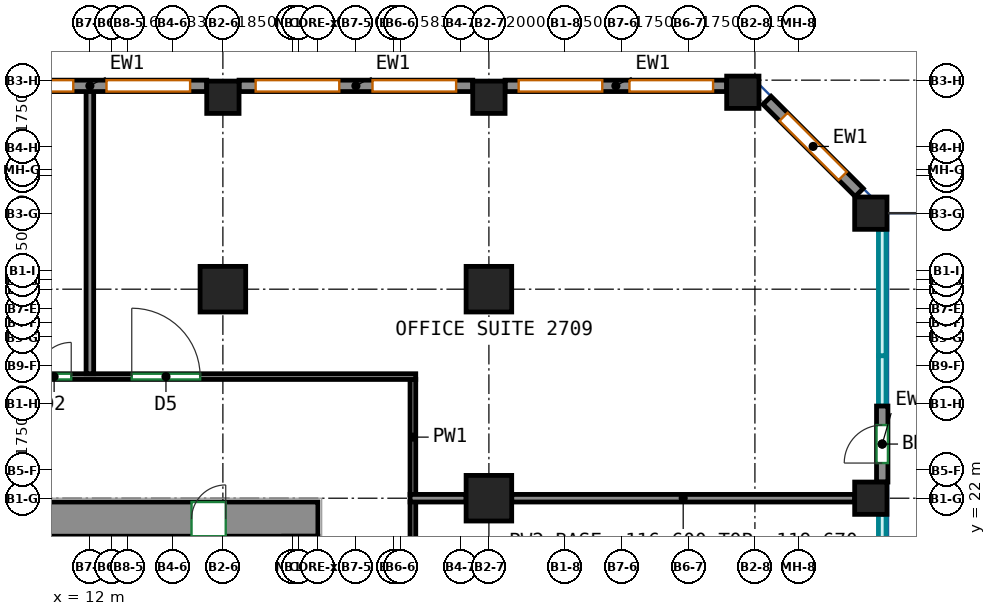
"""IFC4 building model, lengths in metres.
Left out: names, types, materials, properties, quantities, classifications, styles, units other than length and angle.
Written with IfcOpenShell. Run it as: python <this file> out.ifc"""

import sys

from ifc_helpers import new_model, si_unit, direction, frame, frame_2d, origin, origin_2d, place, context, subcontext, project, spatial, rectangle, extrude, source, transform, mapped, element, fill, save


model = new_model("IFC4")
c1 = context("Model", 3, precision=1e-05, world=origin(), true_north=direction((0.0, 1.0)))
c2 = subcontext(c1, "Body", "Model", "MODEL_VIEW")
j1 = project(units=[si_unit("LENGTHUNIT", "METRE"), si_unit("PLANEANGLEUNIT", "RADIAN")], contexts=[c1])
p1 = place(None, origin())
s1 = spatial("IfcSite", under=j1, at=p1, CompositionType="ELEMENT")
p2 = place(p1, origin())
s2 = spatial("IfcBuilding", under=s1, at=p2, CompositionType="ELEMENT")
p3 = place(p2, frame((0.0, 0.0, 116.6)))
s3 = spatial("IfcBuildingStorey", under=s2, at=p3, CompositionType="ELEMENT", Elevation=116.6)
m1 = source(origin(), c2, "Body", "SweptSolid", [
    extrude(rectangle(XDim=1.2, YDim=1.2, at=origin_2d()), origin(), (0.0, 0.0, 1.0), 3.72),
])
p4 = place(p3, frame((15.5, 27.5, 0.0), z_axis=(0.0, 0.0, 1.0), x_axis=(1.0, 0.0, 0.0)))
e1 = element("IfcColumn", 1, at=p4, inside=s3, PredefinedType="COLUMN", context=c2, shape_type="MappedRepresentation", body=[
    mapped(m1, transform((0.0, 0.0, 0.0))),
])
m2 = source(origin(), c2, "Body", "SweptSolid", [
    extrude(rectangle(XDim=0.85, YDim=0.85, at=origin_2d()), origin(), (0.0, 0.0, 1.0), 3.72),
])
p5 = place(p3, frame((15.5, 32.55, 0.0), z_axis=(0.0, 0.0, 1.0), x_axis=(1.0, 0.0, 0.0)))
e2 = element("IfcColumn", 2, at=p5, inside=s3, PredefinedType="COLUMN", context=c2, shape_type="MappedRepresentation", body=[
    mapped(m2, transform((0.0, 0.0, 0.0))),
])
for number, where, z_axis, x_axis in (
    (3, (22.5, 22.0, 0.0), (0.0, 0.0, 1.0), (1.0, 0.0, 0.0)),
    (4, (22.5, 27.5, 0.0), (0.0, 0.0, 1.0), (1.0, 0.0, 0.0)),
):
    element("IfcColumn", number, at=place(p3, frame(where, z_axis=z_axis, x_axis=x_axis)), inside=s3, PredefinedType="COLUMN", context=c2, shape_type="MappedRepresentation", body=[
        mapped(m1, transform((0.0, 0.0, 0.0))),
    ])
for number, where, z_axis, x_axis in (
    (5, (22.5, 32.55, 0.0), (0.0, 0.0, 1.0), (1.0, 0.0, 0.0)),
    (6, (29.182, 32.682, 0.0), (0.0, 0.0, 1.0), (1.0, 0.0, 0.0)),
    (7, (32.55, 22.0, 0.0), (0.0, 0.0, 1.0), (1.0, 0.0, 0.0)),
    (8, (32.55, 29.5, 0.0), (0.0, 0.0, 1.0), (1.0, 0.0, 0.0)),
):
    element("IfcColumn", number, at=place(p3, frame(where, z_axis=z_axis, x_axis=x_axis)), inside=s3, PredefinedType="COLUMN", context=c2, shape_type="MappedRepresentation", body=[
        mapped(m2, transform((0.0, 0.0, 0.0))),
    ])
m3 = source(origin(), c2, "Body", "SweptSolid", [
    extrude(rectangle(XDim=33.9, YDim=0.9, at=frame_2d((16.95, 0.0))), origin(), (0.0, 0.0, 1.0), 3.72),
])
p6 = place(p3, frame((-15.9, 21.45, 0.0), z_axis=(0.0, 0.0, 1.0), x_axis=(1.0, 0.0, 0.0)))
e9 = element("IfcWall", 9, at=p6, inside=s3, PredefinedType="SHEAR", context=c2, shape_type="MappedRepresentation", body=[
    mapped(m3, transform((0.0, 0.0, 0.0))),
])
p7 = place(p6, frame((7.12, 0.0, 0.0)))
e10 = element("IfcOpeningElement", 10, at=p7, cuts=e9, PredefinedType="OPENING", context=c2, shape_type="SweptSolid", body=[
    extrude(rectangle(XDim=0.9, YDim=2.1, at=frame_2d((0.45, 1.05))), frame((0.0, 0.46, 0.0), z_axis=(0.0, -1.0, 0.0), x_axis=(1.0, 0.0, 0.0)), (0.0, 0.0, 1.0), 0.92),
])
p8 = place(p6, frame((11.1, 0.0, 0.0)))
e11 = element("IfcOpeningElement", 11, at=p8, cuts=e9, PredefinedType="OPENING", context=c2, shape_type="SweptSolid", body=[
    extrude(rectangle(XDim=0.9, YDim=2.1, at=frame_2d((0.45, 1.05))), frame((0.0, 0.46, 0.0), z_axis=(0.0, -1.0, 0.0), x_axis=(1.0, 0.0, 0.0)), (0.0, 0.0, 1.0), 0.92),
])
p9 = place(p6, frame((14.45, 0.0, 0.0)))
e12 = element("IfcOpeningElement", 12, at=p9, cuts=e9, PredefinedType="OPENING", context=c2, shape_type="SweptSolid", body=[
    extrude(rectangle(XDim=0.9, YDim=2.1, at=frame_2d((0.45, 1.05))), frame((0.0, 0.46, 0.0), z_axis=(0.0, -1.0, 0.0), x_axis=(1.0, 0.0, 0.0)), (0.0, 0.0, 1.0), 0.92),
])
p10 = place(p6, frame((19.274, 0.0, 0.0)))
e13 = element("IfcOpeningElement", 13, at=p10, cuts=e9, PredefinedType="OPENING", context=c2, shape_type="SweptSolid", body=[
    extrude(rectangle(XDim=0.9, YDim=2.1, at=frame_2d((0.45, 1.05))), frame((0.0, 0.46, 0.0), z_axis=(0.0, -1.0, 0.0), x_axis=(1.0, 0.0, 0.0)), (0.0, 0.0, 1.0), 0.92),
])
p11 = place(p6, frame((25.304, 0.0, 0.0)))
e14 = element("IfcOpeningElement", 14, at=p11, cuts=e9, PredefinedType="OPENING", context=c2, shape_type="SweptSolid", body=[
    extrude(rectangle(XDim=0.9, YDim=2.1, at=frame_2d((0.45, 1.05))), frame((0.0, 0.46, 0.0), z_axis=(0.0, -1.0, 0.0), x_axis=(1.0, 0.0, 0.0)), (0.0, 0.0, 1.0), 0.92),
])
p12 = place(p6, frame((2.425, 0.0, 0.0)))
e15 = element("IfcOpeningElement", 15, at=p12, cuts=e9, PredefinedType="OPENING", context=c2, shape_type="SweptSolid", body=[
    extrude(rectangle(XDim=0.9, YDim=2.1, at=frame_2d((0.45, 1.05))), frame((0.0, 0.46, 0.0), z_axis=(0.0, -1.0, 0.0), x_axis=(1.0, 0.0, 0.0)), (0.0, 0.0, 1.0), 0.92),
])
p13 = place(p6, frame((30.575, 0.0, 0.0)))
e16 = element("IfcOpeningElement", 16, at=p13, cuts=e9, PredefinedType="OPENING", context=c2, shape_type="SweptSolid", body=[
    extrude(rectangle(XDim=0.9, YDim=2.1, at=frame_2d((0.45, 1.05))), frame((0.0, 0.46, 0.0), z_axis=(0.0, -1.0, 0.0), x_axis=(1.0, 0.0, 0.0)), (0.0, 0.0, 1.0), 0.92),
])
m4 = source(origin(), c2, "Body", "SweptSolid", [
    extrude(rectangle(XDim=2.0, YDim=0.3, at=frame_2d((1.0, 0.0))), origin(), (0.0, 0.0, 1.0), 3.72),
])
p14 = place(p3, frame((32.85, 22.425, 0.0), z_axis=(0.0, 0.0, 1.0), x_axis=(0.0, 1.0, 0.0)))
e17 = element("IfcWall", 17, at=p14, inside=s3, PredefinedType="SOLIDWALL", context=c2, shape_type="MappedRepresentation", body=[
    mapped(m4, transform((0.0, 0.0, 0.0))),
])
p15 = place(p14, frame((0.5, 0.0, 0.0)))
e18 = element("IfcOpeningElement", 18, at=p15, cuts=e17, PredefinedType="OPENING", context=c2, shape_type="SweptSolid", body=[
    extrude(rectangle(XDim=1.0, YDim=2.1, at=frame_2d((0.5, 1.05))), frame((0.0, 0.16, 0.0), z_axis=(0.0, -1.0, 0.0), x_axis=(1.0, 0.0, 0.0)), (0.0, 0.0, 1.0), 0.32),
])
m5 = source(origin(), c2, "Body", "SweptSolid", [
    extrude(rectangle(XDim=3.429, YDim=0.3, at=frame_2d((1.715, 0.0))), origin(), (0.0, 0.0, 1.0), 3.72),
])
p16 = place(p3, frame((32.244, 30.044, 0.0), z_axis=(0.0, 0.0, 1.0), x_axis=(-0.707106781187, 0.707106781187, 0.0)))
e19 = element("IfcWall", 19, at=p16, inside=s3, PredefinedType="SOLIDWALL", context=c2, shape_type="MappedRepresentation", body=[
    mapped(m5, transform((0.0, 0.0, 0.0))),
])
p17 = place(p16, frame((0.615, 0.0, 0.7)))
e20 = element("IfcOpeningElement", 20, at=p17, cuts=e19, PredefinedType="OPENING", context=c2, shape_type="SweptSolid", body=[
    extrude(rectangle(XDim=2.2, YDim=2.25, at=frame_2d((1.1, 1.125))), frame((0.0, 0.16, 0.0), z_axis=(0.0, -1.0, 0.0), x_axis=(1.0, 0.0, 0.0)), (0.0, 0.0, 1.0), 0.32),
])
m6 = source(origin(), c2, "Body", "SweptSolid", [
    extrude(rectangle(XDim=5.832, YDim=0.3, at=frame_2d((2.916, 0.0))), origin(), (0.0, 0.0, 1.0), 3.72),
])
p18 = place(p3, frame((28.757, 32.85, 0.0), z_axis=(0.0, 0.0, 1.0), x_axis=(-1.0, 0.0, 0.0)))
e21 = element("IfcWall", 21, at=p18, inside=s3, PredefinedType="SOLIDWALL", context=c2, shape_type="MappedRepresentation", body=[
    mapped(m6, transform((0.0, 0.0, 0.0))),
])
p19 = place(p18, frame((0.358, 0.0, 0.7)))
e22 = element("IfcOpeningElement", 22, at=p19, cuts=e21, PredefinedType="OPENING", context=c2, shape_type="SweptSolid", body=[
    extrude(rectangle(XDim=2.2, YDim=2.25, at=frame_2d((1.1, 1.125))), frame((0.0, 0.16, 0.0), z_axis=(0.0, -1.0, 0.0), x_axis=(1.0, 0.0, 0.0)), (0.0, 0.0, 1.0), 0.32),
])
p20 = place(p18, frame((3.274, 0.0, 0.7)))
e23 = element("IfcOpeningElement", 23, at=p20, cuts=e21, PredefinedType="OPENING", context=c2, shape_type="SweptSolid", body=[
    extrude(rectangle(XDim=2.2, YDim=2.25, at=frame_2d((1.1, 1.125))), frame((0.0, 0.16, 0.0), z_axis=(0.0, -1.0, 0.0), x_axis=(1.0, 0.0, 0.0)), (0.0, 0.0, 1.0), 0.32),
])
m7 = source(origin(), c2, "Body", "SweptSolid", [
    extrude(rectangle(XDim=6.15, YDim=0.3, at=frame_2d((3.075, 0.0))), origin(), (0.0, 0.0, 1.0), 3.72),
])
p21 = place(p3, frame((22.075, 32.85, 0.0), z_axis=(0.0, 0.0, 1.0), x_axis=(-1.0, 0.0, 0.0)))
e24 = element("IfcWall", 24, at=p21, inside=s3, PredefinedType="SOLIDWALL", context=c2, shape_type="MappedRepresentation", body=[
    mapped(m7, transform((0.0, 0.0, 0.0))),
])
p22 = place(p21, frame((0.438, 0.0, 0.7)))
e25 = element("IfcOpeningElement", 25, at=p22, cuts=e24, PredefinedType="OPENING", context=c2, shape_type="SweptSolid", body=[
    extrude(rectangle(XDim=2.2, YDim=2.25, at=frame_2d((1.1, 1.125))), frame((0.0, 0.16, 0.0), z_axis=(0.0, -1.0, 0.0), x_axis=(1.0, 0.0, 0.0)), (0.0, 0.0, 1.0), 0.32),
])
p23 = place(p21, frame((3.512, 0.0, 0.7)))
e26 = element("IfcOpeningElement", 26, at=p23, cuts=e24, PredefinedType="OPENING", context=c2, shape_type="SweptSolid", body=[
    extrude(rectangle(XDim=2.2, YDim=2.25, at=frame_2d((1.1, 1.125))), frame((0.0, 0.16, 0.0), z_axis=(0.0, -1.0, 0.0), x_axis=(1.0, 0.0, 0.0)), (0.0, 0.0, 1.0), 0.32),
])
p24 = place(p3, frame((15.075, 32.85, 0.0), z_axis=(0.0, 0.0, 1.0), x_axis=(-1.0, 0.0, 0.0)))
e27 = element("IfcWall", 27, at=p24, inside=s3, PredefinedType="SOLIDWALL", context=c2, shape_type="MappedRepresentation", body=[
    mapped(m7, transform((0.0, 0.0, 0.0))),
])
p25 = place(p24, frame((0.438, 0.0, 0.7)))
e28 = element("IfcOpeningElement", 28, at=p25, cuts=e27, PredefinedType="OPENING", context=c2, shape_type="SweptSolid", body=[
    extrude(rectangle(XDim=2.2, YDim=2.25, at=frame_2d((1.1, 1.125))), frame((0.0, 0.16, 0.0), z_axis=(0.0, -1.0, 0.0), x_axis=(1.0, 0.0, 0.0)), (0.0, 0.0, 1.0), 0.32),
])
p26 = place(p24, frame((3.512, 0.0, 0.7)))
e29 = element("IfcOpeningElement", 29, at=p26, cuts=e27, PredefinedType="OPENING", context=c2, shape_type="SweptSolid", body=[
    extrude(rectangle(XDim=2.2, YDim=2.25, at=frame_2d((1.1, 1.125))), frame((0.0, 0.16, 0.0), z_axis=(0.0, -1.0, 0.0), x_axis=(1.0, 0.0, 0.0)), (0.0, 0.0, 1.0), 0.32),
])
p27 = place(p3, frame((20.5, 17.75, 0.0), z_axis=(0.0, 0.0, 1.0), x_axis=(0.0, 1.0, 0.0)))
e30 = element("IfcWall", 30, at=p27, inside=s3, PredefinedType="PARTITIONING", context=c2, shape_type="SweptSolid", body=[
    extrude(rectangle(XDim=4.16, YDim=0.15, at=frame_2d((2.08, 0.0))), origin(), (0.0, 0.0, 1.0), 3.72),
])
p28 = place(p3, frame((20.5, 22.09, 0.0), z_axis=(0.0, 0.0, 1.0), x_axis=(0.0, 1.0, 0.0)))
e31 = element("IfcWall", 31, at=p28, inside=s3, PredefinedType="PARTITIONING", context=c2, shape_type="SweptSolid", body=[
    extrude(rectangle(XDim=3.035, YDim=0.15, at=frame_2d((1.518, 0.0))), origin(), (0.0, 0.0, 1.0), 3.72),
])
p29 = place(p3, frame((-19.6, 25.2, 0.0), z_axis=(0.0, 0.0, 1.0), x_axis=(1.0, 0.0, 0.0)))
e32 = element("IfcWall", 32, at=p29, inside=s3, PredefinedType="PARTITIONING", context=c2, shape_type="SweptSolid", body=[
    extrude(rectangle(XDim=40.175, YDim=0.15, at=frame_2d((20.087, 0.0))), origin(), (0.0, 0.0, 1.0), 3.72),
])
p30 = place(p29, frame((1.104, 0.0, 0.0)))
e33 = element("IfcOpeningElement", 33, at=p30, cuts=e32, PredefinedType="OPENING", context=c2, shape_type="SweptSolid", body=[
    extrude(rectangle(XDim=0.9, YDim=2.1, at=frame_2d((0.45, 1.05))), frame((0.0, 0.085, 0.0), z_axis=(0.0, -1.0, 0.0), x_axis=(1.0, 0.0, 0.0)), (0.0, 0.0, 1.0), 0.17),
])
p31 = place(p29, frame((5.296, 0.0, 0.0)))
e34 = element("IfcOpeningElement", 34, at=p31, cuts=e32, PredefinedType="OPENING", context=c2, shape_type="SweptSolid", body=[
    extrude(rectangle(XDim=0.9, YDim=2.1, at=frame_2d((0.45, 1.05))), frame((0.0, 0.085, 0.0), z_axis=(0.0, -1.0, 0.0), x_axis=(1.0, 0.0, 0.0)), (0.0, 0.0, 1.0), 0.17),
])
p32 = place(p29, frame((18.302, 0.0, 0.0)))
e35 = element("IfcOpeningElement", 35, at=p32, cuts=e32, PredefinedType="OPENING", context=c2, shape_type="SweptSolid", body=[
    extrude(rectangle(XDim=1.0, YDim=2.1, at=frame_2d((0.5, 1.05))), frame((0.0, 0.085, 0.0), z_axis=(0.0, -1.0, 0.0), x_axis=(1.0, 0.0, 0.0)), (0.0, 0.0, 1.0), 0.17),
])
p33 = place(p29, frame((30.209, 0.0, 0.0)))
e36 = element("IfcOpeningElement", 36, at=p33, cuts=e32, PredefinedType="OPENING", context=c2, shape_type="SweptSolid", body=[
    extrude(rectangle(XDim=0.9, YDim=2.1, at=frame_2d((0.45, 1.05))), frame((0.0, 0.085, 0.0), z_axis=(0.0, -1.0, 0.0), x_axis=(1.0, 0.0, 0.0)), (0.0, 0.0, 1.0), 0.17),
])
p34 = place(p29, frame((32.702, 0.0, 0.0)))
e37 = element("IfcOpeningElement", 37, at=p34, cuts=e32, PredefinedType="OPENING", context=c2, shape_type="SweptSolid", body=[
    extrude(rectangle(XDim=1.8, YDim=2.1, at=frame_2d((0.9, 1.05))), frame((0.0, 0.085, 0.0), z_axis=(0.0, -1.0, 0.0), x_axis=(1.0, 0.0, 0.0)), (0.0, 0.0, 1.0), 0.17),
])
p35 = place(p3, frame((20.426, 22.0, 0.0), z_axis=(0.0, 0.0, 1.0), x_axis=(1.0, 0.0, 0.0)))
e38 = element("IfcWall", 38, at=p35, inside=s3, PredefinedType="PARTITIONING", context=c2, shape_type="SweptSolid", body=[
    extrude(rectangle(XDim=1.474, YDim=0.2, at=frame_2d((0.737, 0.0))), origin(), (0.0, 0.0, 1.0), 3.72),
])
p36 = place(p3, frame((23.1, 22.0, 0.0), z_axis=(0.0, 0.0, 1.0), x_axis=(1.0, 0.0, 0.0)))
e39 = element("IfcWall", 39, at=p36, inside=s3, PredefinedType="PARTITIONING", context=c2, shape_type="SweptSolid", body=[
    extrude(rectangle(XDim=9.025, YDim=0.2, at=frame_2d((4.512, 0.0))), origin(), (0.0, 0.0, 1.0), 3.07),
])
p37 = place(p3, frame((12.0, 25.276, 0.0), z_axis=(0.0, 0.0, 1.0), x_axis=(0.0, 1.0, 0.0)))
e40 = element("IfcWall", 40, at=p37, inside=s3, PredefinedType="PARTITIONING", context=c2, shape_type="SweptSolid", body=[
    extrude(rectangle(XDim=7.474, YDim=0.2, at=frame_2d((3.737, 0.0))), origin(), (0.0, 0.0, 1.0), 3.72),
])
p38 = place(p15, origin())
e41 = element("IfcDoor", 41, at=p38, inside=s3, OperationType="SINGLE_SWING_LEFT", PredefinedType="DOOR", context=c2, shape_type="SweptSolid", body=[
    extrude(rectangle(XDim=1.0, YDim=2.1, at=frame_2d((0.5, 1.05))), frame((0.0, 0.025, 0.0), z_axis=(0.0, -1.0, 0.0), x_axis=(1.0, 0.0, 0.0)), (0.0, 0.0, 1.0), 0.05),
])
fill(e18, e41)
p39 = place(p17, origin())
e42 = element("IfcWindow", 42, at=p39, inside=s3, PartitioningType="SINGLE_PANEL", PredefinedType="WINDOW", context=c2, shape_type="SweptSolid", body=[
    extrude(rectangle(XDim=2.2, YDim=2.25, at=frame_2d((1.1, 1.125))), frame((0.0, 0.03, 0.0), z_axis=(0.0, -1.0, 0.0), x_axis=(1.0, 0.0, 0.0)), (0.0, 0.0, 1.0), 0.06),
])
fill(e20, e42)
p40 = place(p19, origin())
e43 = element("IfcWindow", 43, at=p40, inside=s3, PartitioningType="SINGLE_PANEL", PredefinedType="WINDOW", context=c2, shape_type="SweptSolid", body=[
    extrude(rectangle(XDim=2.2, YDim=2.25, at=frame_2d((1.1, 1.125))), frame((0.0, 0.03, 0.0), z_axis=(0.0, -1.0, 0.0), x_axis=(1.0, 0.0, 0.0)), (0.0, 0.0, 1.0), 0.06),
])
fill(e22, e43)
p41 = place(p20, origin())
e44 = element("IfcWindow", 44, at=p41, inside=s3, PartitioningType="SINGLE_PANEL", PredefinedType="WINDOW", context=c2, shape_type="SweptSolid", body=[
    extrude(rectangle(XDim=2.2, YDim=2.25, at=frame_2d((1.1, 1.125))), frame((0.0, 0.03, 0.0), z_axis=(0.0, -1.0, 0.0), x_axis=(1.0, 0.0, 0.0)), (0.0, 0.0, 1.0), 0.06),
])
fill(e23, e44)
p42 = place(p22, origin())
e45 = element("IfcWindow", 45, at=p42, inside=s3, PartitioningType="SINGLE_PANEL", PredefinedType="WINDOW", context=c2, shape_type="SweptSolid", body=[
    extrude(rectangle(XDim=2.2, YDim=2.25, at=frame_2d((1.1, 1.125))), frame((0.0, 0.03, 0.0), z_axis=(0.0, -1.0, 0.0), x_axis=(1.0, 0.0, 0.0)), (0.0, 0.0, 1.0), 0.06),
])
fill(e25, e45)
p43 = place(p23, origin())
e46 = element("IfcWindow", 46, at=p43, inside=s3, PartitioningType="SINGLE_PANEL", PredefinedType="WINDOW", context=c2, shape_type="SweptSolid", body=[
    extrude(rectangle(XDim=2.2, YDim=2.25, at=frame_2d((1.1, 1.125))), frame((0.0, 0.03, 0.0), z_axis=(0.0, -1.0, 0.0), x_axis=(1.0, 0.0, 0.0)), (0.0, 0.0, 1.0), 0.06),
])
fill(e26, e46)
p44 = place(p25, origin())
e47 = element("IfcWindow", 47, at=p44, inside=s3, PartitioningType="SINGLE_PANEL", PredefinedType="WINDOW", context=c2, shape_type="SweptSolid", body=[
    extrude(rectangle(XDim=2.2, YDim=2.25, at=frame_2d((1.1, 1.125))), frame((0.0, 0.03, 0.0), z_axis=(0.0, -1.0, 0.0), x_axis=(1.0, 0.0, 0.0)), (0.0, 0.0, 1.0), 0.06),
])
fill(e28, e47)
p45 = place(p26, origin())
e48 = element("IfcWindow", 48, at=p45, inside=s3, PartitioningType="SINGLE_PANEL", PredefinedType="WINDOW", context=c2, shape_type="SweptSolid", body=[
    extrude(rectangle(XDim=2.2, YDim=2.25, at=frame_2d((1.1, 1.125))), frame((0.0, 0.03, 0.0), z_axis=(0.0, -1.0, 0.0), x_axis=(1.0, 0.0, 0.0)), (0.0, 0.0, 1.0), 0.06),
])
fill(e29, e48)
p46 = place(p13, origin())
e49 = element("IfcDoor", 49, at=p46, inside=s3, OperationType="SINGLE_SWING_RIGHT", PredefinedType="DOOR", context=c2, shape_type="SweptSolid", body=[
    extrude(rectangle(XDim=0.9, YDim=2.1, at=frame_2d((0.45, 1.05))), frame((0.0, -0.305, 0.0), z_axis=(0.0, -1.0, 0.0), x_axis=(1.0, 0.0, 0.0)), (0.0, 0.0, 1.0), 0.05),
])
fill(e16, e49)
p47 = place(p33, origin())
e50 = element("IfcDoor", 50, at=p47, inside=s3, OperationType="SINGLE_SWING_RIGHT", PredefinedType="DOOR", context=c2, shape_type="SweptSolid", body=[
    extrude(rectangle(XDim=0.9, YDim=2.1, at=frame_2d((0.45, 1.05))), frame((0.0, 0.025, 0.0), z_axis=(0.0, -1.0, 0.0), x_axis=(1.0, 0.0, 0.0)), (0.0, 0.0, 1.0), 0.05),
])
fill(e36, e50)
p48 = place(p34, origin())
e51 = element("IfcDoor", 51, at=p48, inside=s3, OperationType="DOUBLE_DOOR_SINGLE_SWING", PredefinedType="DOOR", context=c2, shape_type="SweptSolid", body=[
    extrude(rectangle(XDim=1.8, YDim=2.1, at=frame_2d((0.9, 1.05))), frame((0.0, 0.025, 0.0), z_axis=(0.0, -1.0, 0.0), x_axis=(1.0, 0.0, 0.0)), (0.0, 0.0, 1.0), 0.05),
])
fill(e37, e51)
save(model, sys.argv[1])
